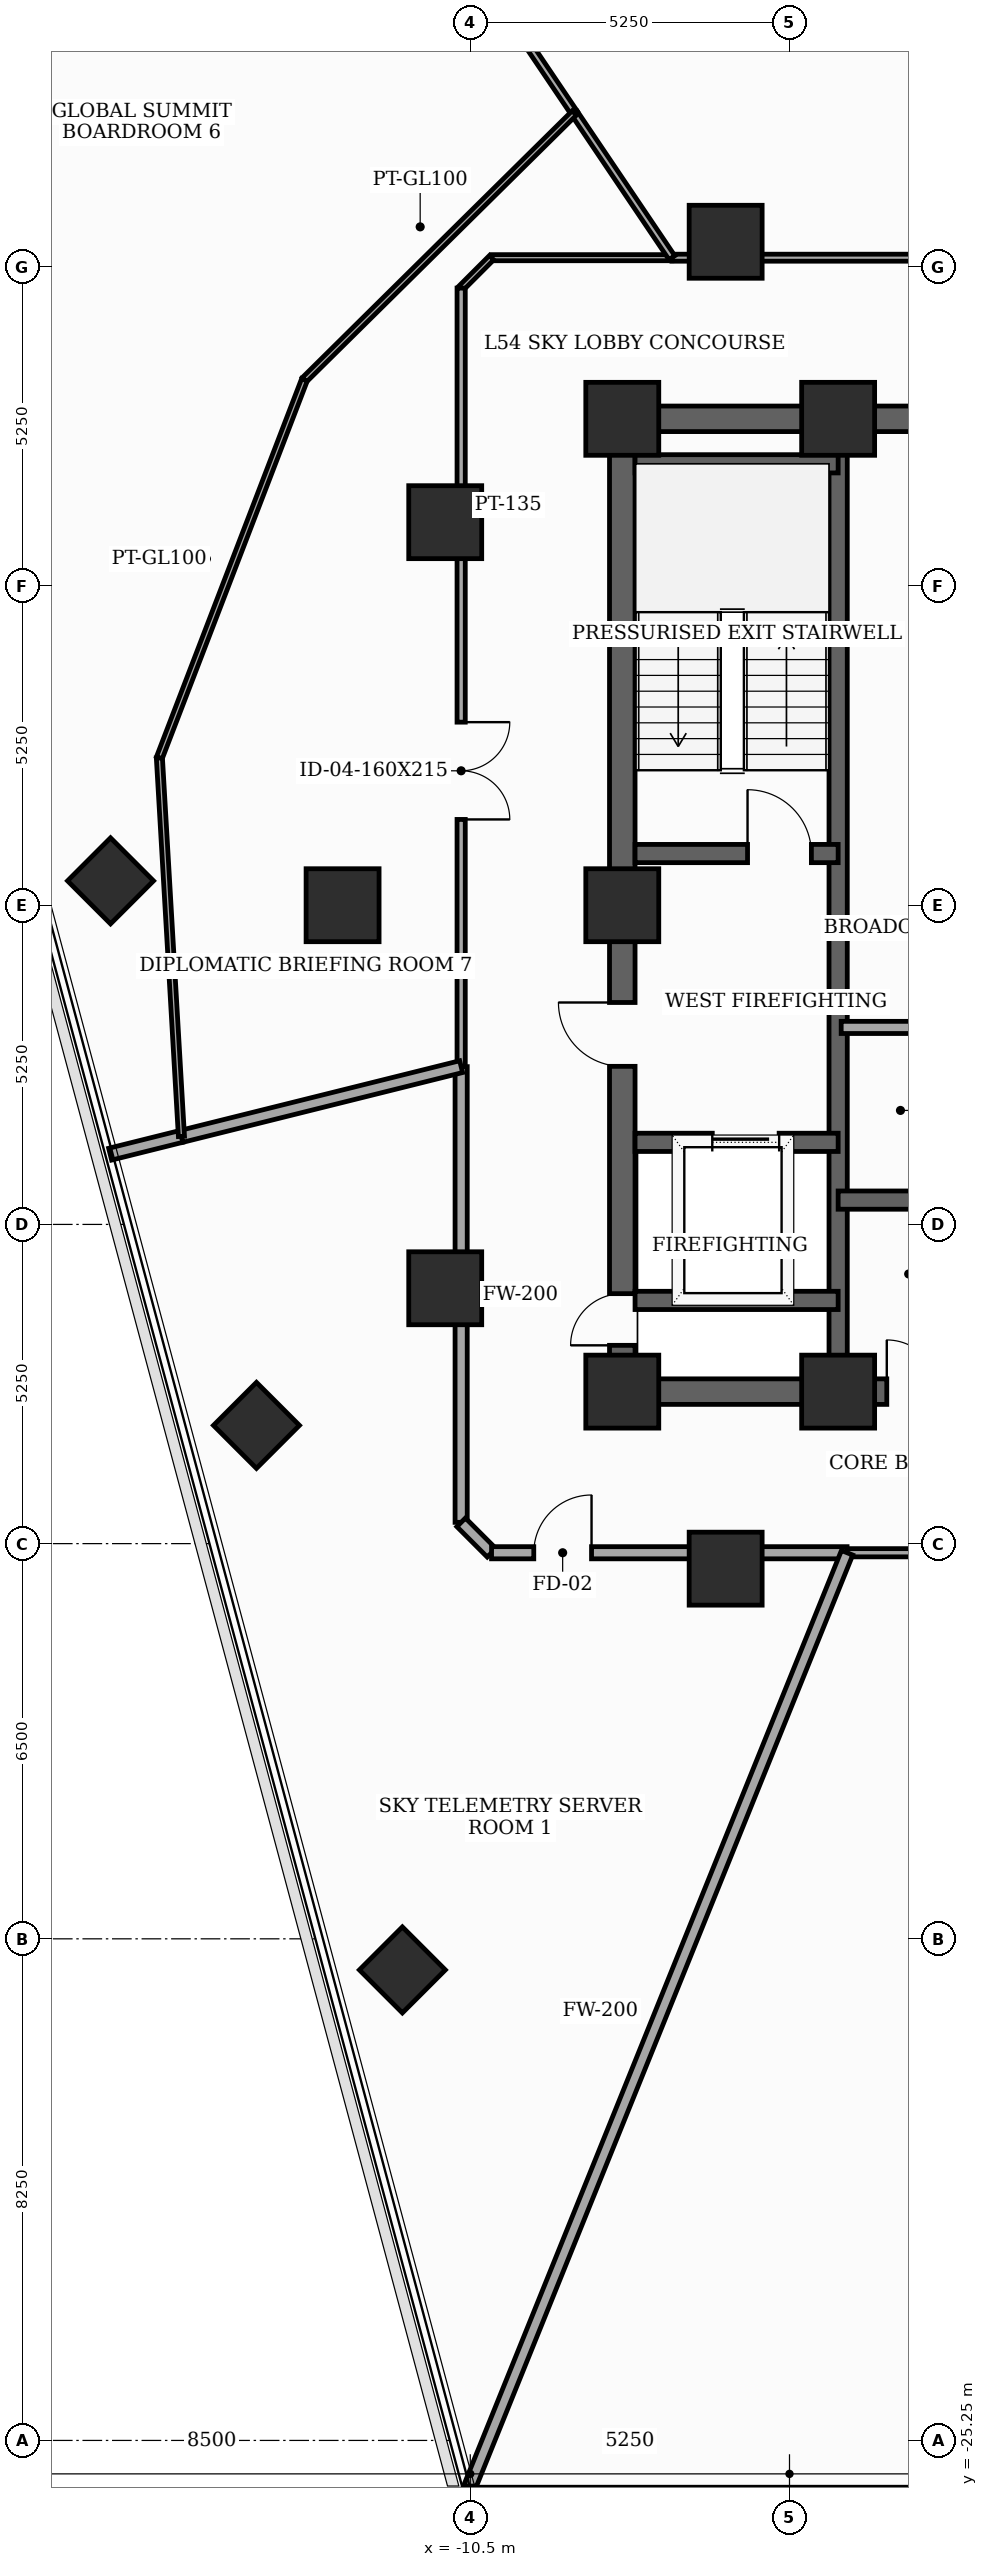
"""IFC4 building model, lengths in metres.
Left out: names, types, materials, properties, quantities, classifications, styles, units other than length and angle.
Written with IfcOpenShell. Run it as: python <this file> out.ifc"""

import sys

from ifc_helpers import new_model, si_unit, direction, frame, frame_2d, origin, origin_2d, place, context, subcontext, project, spatial, rectangle, extrude, element, fill, save


model = new_model("IFC4")
c1 = context("Model", 3, precision=1e-05, world=origin(), true_north=direction((0.0, 1.0)))
c2 = subcontext(c1, "Body", "Model", "MODEL_VIEW")
j1 = project(units=[si_unit("LENGTHUNIT", "METRE"), si_unit("PLANEANGLEUNIT", "RADIAN")], contexts=[c1])
p1 = place(None, origin())
s1 = spatial("IfcSite", under=j1, at=p1, CompositionType="ELEMENT")
p2 = place(p1, origin())
s2 = spatial("IfcBuilding", under=s1, at=p2, CompositionType="ELEMENT")
p3 = place(p2, frame((0.0, 0.0, 210.1)))
s3 = spatial("IfcBuildingStorey", under=s2, at=p3, CompositionType="ELEMENT", Elevation=210.1)
for number, where, z_axis, x_axis in (
    (1, (-8.0, -8.0, 0.0), (0.0, 0.0, 1.0), (1.0, 0.0, 0.0)),
    (2, (-4.45, -8.0, 0.0), (0.0, 0.0, 1.0), (1.0, 0.0, 0.0)),
    (3, (-4.45, 8.0, 0.0), (0.0, 0.0, 1.0), (1.0, 0.0, 0.0)),
    (4, (-8.0, 8.0, 0.0), (0.0, 0.0, 1.0), (1.0, 0.0, 0.0)),
    (5, (-8.0, 0.0, 0.0), (0.0, 0.0, 1.0), (1.0, 0.0, 0.0)),
    (6, (-6.3, 10.912, 0.0), (0.0, 0.0, 1.0), (1.0, 0.0, 0.0)),
    (7, (-10.912, 6.3, 0.0), (0.0, 0.0, 1.0), (1.0, 0.0, 0.0)),
    (8, (-12.6, 0.0, 0.0), (0.0, 0.0, 1.0), (1.0, 0.0, 0.0)),
    (9, (-10.912, -6.3, 0.0), (0.0, 0.0, 1.0), (1.0, 0.0, 0.0)),
    (10, (-6.3, -10.912, 0.0), (0.0, 0.0, 1.0), (1.0, 0.0, 0.0)),
):
    element("IfcColumn", number, at=place(p3, frame(where, z_axis=z_axis, x_axis=x_axis)), inside=s3, PredefinedType="COLUMN", context=c2, shape_type="SweptSolid", body=[
        extrude(rectangle(XDim=1.2, YDim=1.2, at=origin_2d()), origin(), (0.0, 0.0, 1.0), 3.7),
    ])
for number, where, z_axis, x_axis in (
    (11, (-16.416, 0.401, 0.0), (0.0, 0.0, 1.0), (0.707, 0.707, 0.0)),
    (12, (-14.016, -8.555, 0.0), (0.0, 0.0, 1.0), (0.707, 0.707, 0.0)),
    (13, (-11.616, -17.511, 0.0), (0.0, 0.0, 1.0), (0.707, 0.707, 0.0)),
):
    element("IfcColumn", number, at=place(p3, frame(where, z_axis=z_axis, x_axis=x_axis)), inside=s3, PredefinedType="COLUMN", context=c2, shape_type="SweptSolid", body=[
        extrude(rectangle(XDim=1.0, YDim=1.0, at=origin_2d()), origin(), (0.0, 0.0, 1.0), 3.7),
    ])
p4 = place(p3, frame((-8.0, -8.0, 0.0), z_axis=(0.0, 0.0, 1.0), x_axis=(0.0, 1.0, 0.0)))
e14 = element("IfcWall", 14, at=p4, inside=s3, PredefinedType="SHEAR", context=c2, shape_type="SweptSolid", body=[
    extrude(rectangle(XDim=16.0, YDim=0.42, at=frame_2d((8.0, 0.0))), origin(), (0.0, 0.0, 1.0), 3.46),
])
p5 = place(p4, frame((0.761, 0.0, 0.0)))
e15 = element("IfcOpeningElement", 15, at=p5, cuts=e14, PredefinedType="OPENING", context=c2, shape_type="SweptSolid", body=[
    extrude(rectangle(XDim=0.85, YDim=2.02, at=frame_2d((0.425, 1.01))), frame((0.0, 0.22, 0.0), z_axis=(0.0, -1.0, 0.0), x_axis=(1.0, 0.0, 0.0)), (0.0, 0.0, 1.0), 0.44),
])
p6 = place(p4, frame((5.35, 0.0, 0.0)))
e16 = element("IfcOpeningElement", 16, at=p6, cuts=e14, PredefinedType="OPENING", context=c2, shape_type="SweptSolid", body=[
    extrude(rectangle(XDim=1.05, YDim=2.15, at=frame_2d((0.525, 1.075))), frame((0.0, 0.22, 0.0), z_axis=(0.0, -1.0, 0.0), x_axis=(1.0, 0.0, 0.0)), (0.0, 0.0, 1.0), 0.44),
])
p7 = place(p3, frame((-8.0, -8.0, 0.0), z_axis=(0.0, 0.0, 1.0), x_axis=(1.0, 0.0, 0.0)))
e17 = element("IfcWall", 17, at=p7, inside=s3, PredefinedType="SHEAR", context=c2, shape_type="SweptSolid", body=[
    extrude(rectangle(XDim=16.0, YDim=0.42, at=frame_2d((8.0, 0.0))), origin(), (0.0, 0.0, 1.0), 3.46),
])
p8 = place(p7, frame((4.35, 0.0, 0.0)))
e18 = element("IfcOpeningElement", 18, at=p8, cuts=e17, PredefinedType="OPENING", context=c2, shape_type="SweptSolid", body=[
    extrude(rectangle(XDim=0.85, YDim=2.02, at=frame_2d((0.425, 1.01))), frame((0.0, 0.22, 0.0), z_axis=(0.0, -1.0, 0.0), x_axis=(1.0, 0.0, 0.0)), (0.0, 0.0, 1.0), 0.44),
])
p9 = place(p7, frame((6.49, 0.0, 0.0)))
e19 = element("IfcOpeningElement", 19, at=p9, cuts=e17, PredefinedType="OPENING", context=c2, shape_type="SweptSolid", body=[
    extrude(rectangle(XDim=0.85, YDim=2.02, at=frame_2d((0.425, 1.01))), frame((0.0, 0.22, 0.0), z_axis=(0.0, -1.0, 0.0), x_axis=(1.0, 0.0, 0.0)), (0.0, 0.0, 1.0), 0.44),
])
p10 = place(p7, frame((8.69, 0.0, 0.0)))
e20 = element("IfcOpeningElement", 20, at=p10, cuts=e17, PredefinedType="OPENING", context=c2, shape_type="SweptSolid", body=[
    extrude(rectangle(XDim=0.85, YDim=2.02, at=frame_2d((0.425, 1.01))), frame((0.0, 0.22, 0.0), z_axis=(0.0, -1.0, 0.0), x_axis=(1.0, 0.0, 0.0)), (0.0, 0.0, 1.0), 0.44),
])
p11 = place(p7, frame((10.8, 0.0, 0.0)))
e21 = element("IfcOpeningElement", 21, at=p11, cuts=e17, PredefinedType="OPENING", context=c2, shape_type="SweptSolid", body=[
    extrude(rectangle(XDim=0.85, YDim=2.02, at=frame_2d((0.425, 1.01))), frame((0.0, 0.22, 0.0), z_axis=(0.0, -1.0, 0.0), x_axis=(1.0, 0.0, 0.0)), (0.0, 0.0, 1.0), 0.44),
])
p12 = place(p3, frame((-8.0, 8.0, 0.0), z_axis=(0.0, 0.0, 1.0), x_axis=(1.0, 0.0, 0.0)))
e22 = element("IfcWall", 22, at=p12, inside=s3, PredefinedType="SHEAR", context=c2, shape_type="SweptSolid", body=[
    extrude(rectangle(XDim=16.0, YDim=0.42, at=frame_2d((8.0, 0.0))), origin(), (0.0, 0.0, 1.0), 3.46),
])
p13 = place(p12, frame((7.1, 0.0, 0.0)))
e23 = element("IfcOpeningElement", 23, at=p13, cuts=e22, PredefinedType="OPENING", context=c2, shape_type="SweptSolid", body=[
    extrude(rectangle(XDim=1.8, YDim=2.15, at=frame_2d((0.9, 1.075))), frame((0.0, 0.22, 0.0), z_axis=(0.0, -1.0, 0.0), x_axis=(1.0, 0.0, 0.0)), (0.0, 0.0, 1.0), 0.44),
])
p14 = place(p3, frame((-4.45, -7.79, 0.0), z_axis=(0.0, 0.0, 1.0), x_axis=(0.0, 1.0, 0.0)))
e24 = element("IfcWall", 24, at=p14, inside=s3, PredefinedType="SHEAR", context=c2, shape_type="SweptSolid", body=[
    extrude(rectangle(XDim=15.58, YDim=0.3, at=frame_2d((7.79, 0.0))), origin(), (0.0, 0.0, 1.0), 3.46),
])
p15 = place(p3, frame((-7.79, 0.85, 0.0), z_axis=(0.0, 0.0, 1.0), x_axis=(1.0, 0.0, 0.0)))
e25 = element("IfcWall", 25, at=p15, inside=s3, PredefinedType="SHEAR", context=c2, shape_type="SweptSolid", body=[
    extrude(rectangle(XDim=3.34, YDim=0.3, at=frame_2d((1.67, 0.0))), origin(), (0.0, 0.0, 1.0), 3.46),
])
p16 = place(p15, frame((1.85, 0.0, 0.0)))
e26 = element("IfcOpeningElement", 26, at=p16, cuts=e25, PredefinedType="OPENING", context=c2, shape_type="SweptSolid", body=[
    extrude(rectangle(XDim=1.05, YDim=2.15, at=frame_2d((0.525, 1.075))), frame((0.0, 0.16, 0.0), z_axis=(0.0, -1.0, 0.0), x_axis=(1.0, 0.0, 0.0)), (0.0, 0.0, 1.0), 0.32),
])
p17 = place(p3, frame((-7.79, 7.26, 0.0), z_axis=(0.0, 0.0, 1.0), x_axis=(1.0, 0.0, 0.0)))
e27 = element("IfcWall", 27, at=p17, inside=s3, PredefinedType="SHEAR", context=c2, shape_type="SweptSolid", body=[
    extrude(rectangle(XDim=3.34, YDim=0.3, at=frame_2d((1.67, 0.0))), origin(), (0.0, 0.0, 1.0), 3.46),
])
p18 = place(p3, frame((-7.79, -3.9, 0.0), z_axis=(0.0, 0.0, 1.0), x_axis=(1.0, 0.0, 0.0)))
e28 = element("IfcWall", 28, at=p18, inside=s3, PredefinedType="SHEAR", context=c2, shape_type="SweptSolid", body=[
    extrude(rectangle(XDim=3.34, YDim=0.3, at=frame_2d((1.67, 0.0))), origin(), (0.0, 0.0, 1.0), 3.46),
])
p19 = place(p18, frame((1.27, 0.0, 0.0)))
e29 = element("IfcOpeningElement", 29, at=p19, cuts=e28, PredefinedType="OPENING", context=c2, shape_type="SweptSolid", body=[
    extrude(rectangle(XDim=1.1, YDim=2.1, at=frame_2d((0.55, 1.05))), frame((0.0, 0.16, 0.0), z_axis=(0.0, -1.0, 0.0), x_axis=(1.0, 0.0, 0.0)), (0.0, 0.0, 1.0), 0.32),
])
p20 = place(p3, frame((-7.79, -6.5, 0.0), z_axis=(0.0, 0.0, 1.0), x_axis=(1.0, 0.0, 0.0)))
e30 = element("IfcWall", 30, at=p20, inside=s3, PredefinedType="SHEAR", context=c2, shape_type="SweptSolid", body=[
    extrude(rectangle(XDim=3.34, YDim=0.3, at=frame_2d((1.67, 0.0))), origin(), (0.0, 0.0, 1.0), 3.46),
])
p21 = place(p3, frame((-4.45, -4.85, 0.0), z_axis=(0.0, 0.0, 1.0), x_axis=(1.0, 0.0, 0.0)))
e31 = element("IfcWall", 31, at=p21, inside=s3, PredefinedType="SHEAR", context=c2, shape_type="SweptSolid", body=[
    extrude(rectangle(XDim=8.9, YDim=0.3, at=frame_2d((4.45, 0.0))), origin(), (0.0, 0.0, 1.0), 3.46),
])
p22 = place(p3, frame((-4.4, -2.01, 0.0), z_axis=(0.0, 0.0, 1.0), x_axis=(1.0, 0.0, 0.0)))
e32 = element("IfcWall", 32, at=p22, inside=s3, PredefinedType="SOLIDWALL", context=c2, shape_type="SweptSolid", body=[
    extrude(rectangle(XDim=2.68, YDim=0.2, at=frame_2d((1.34, 0.0))), origin(), (0.0, 0.0, 1.0), 3.46),
])
p23 = place(p3, frame((-10.65, -2.655, 0.0), z_axis=(0.0, 0.0, 1.0), x_axis=(0.0, -1.0, 0.0)))
e33 = element("IfcWall", 33, at=p23, inside=s3, PredefinedType="SOLIDWALL", context=c2, shape_type="SweptSolid", body=[
    extrude(rectangle(XDim=7.495, YDim=0.2, at=frame_2d((3.748, 0.0))), origin(), (0.0, 0.0, 1.0), 2.045),
])
p24 = place(p3, frame((-10.65, -10.15, 0.0), z_axis=(0.0, 0.0, 1.0), x_axis=(0.707106781187, -0.707106781187, 0.0)))
e34 = element("IfcWall", 34, at=p24, inside=s3, PredefinedType="SOLIDWALL", context=c2, shape_type="SweptSolid", body=[
    extrude(rectangle(XDim=0.707, YDim=0.2, at=frame_2d((0.354, 0.0))), origin(), (0.0, 0.0, 1.0), 3.46),
])
p25 = place(p3, frame((-10.15, -10.65, 0.0), z_axis=(0.0, 0.0, 1.0), x_axis=(1.0, 0.0, 0.0)))
e35 = element("IfcWall", 35, at=p25, inside=s3, PredefinedType="SOLIDWALL", context=c2, shape_type="SweptSolid", body=[
    extrude(rectangle(XDim=5.847, YDim=0.2, at=frame_2d((2.923, 0.0))), origin(), (0.0, 0.0, 1.0), 2.045),
])
p26 = place(p25, frame((0.694, 0.0, 0.0)))
e36 = element("IfcOpeningElement", 36, at=p26, cuts=e35, PredefinedType="OPENING", context=c2, shape_type="SweptSolid", body=[
    extrude(rectangle(XDim=0.95, YDim=2.0, at=frame_2d((0.475, 1.0))), frame((0.0, 0.11, 0.0), z_axis=(0.0, -1.0, 0.0), x_axis=(1.0, 0.0, 0.0)), (0.0, 0.0, 1.0), 0.22),
])
p27 = place(p3, frame((-4.303, -10.65, 0.0), z_axis=(0.0, 0.0, 1.0), x_axis=(1.0, 0.0, 0.0)))
e37 = element("IfcWall", 37, at=p27, inside=s3, PredefinedType="PARTITIONING", context=c2, shape_type="SweptSolid", body=[
    extrude(rectangle(XDim=12.041, YDim=0.135, at=frame_2d((6.021, 0.0))), origin(), (0.0, 0.0, 1.0), 2.045),
])
p28 = place(p27, frame((5.545, 0.0, 0.0)))
e38 = element("IfcOpeningElement", 38, at=p28, cuts=e37, PredefinedType="OPENING", context=c2, shape_type="SweptSolid", body=[
    extrude(rectangle(XDim=0.95, YDim=2.0, at=frame_2d((0.475, 1.0))), frame((0.0, 0.077, 0.0), z_axis=(0.0, -1.0, 0.0), x_axis=(1.0, 0.0, 0.0)), (0.0, 0.0, 1.0), 0.155),
])
p29 = place(p3, frame((3.46, 10.65, 0.0), z_axis=(0.0, 0.0, 1.0), x_axis=(-1.0, 0.0, 0.0)))
e39 = element("IfcWall", 39, at=p29, inside=s3, PredefinedType="PARTITIONING", context=c2, shape_type="SweptSolid", body=[
    extrude(rectangle(XDim=10.644, YDim=0.115, at=frame_2d((5.322, 0.0))), origin(), (0.0, 0.0, 1.0), 2.045),
])
p30 = place(p29, frame((4.847, 0.0, 0.0)))
e40 = element("IfcOpeningElement", 40, at=p30, cuts=e39, PredefinedType="OPENING", context=c2, shape_type="SweptSolid", body=[
    extrude(rectangle(XDim=0.95, YDim=2.0, at=frame_2d((0.475, 1.0))), frame((0.0, 0.067, 0.0), z_axis=(0.0, -1.0, 0.0), x_axis=(1.0, 0.0, 0.0)), (0.0, 0.0, 1.0), 0.135),
])
p31 = place(p3, frame((-7.184, 10.65, 0.0), z_axis=(0.0, 0.0, 1.0), x_axis=(-1.0, 0.0, 0.0)))
e41 = element("IfcWall", 41, at=p31, inside=s3, PredefinedType="MOVABLE", context=c2, shape_type="SweptSolid", body=[
    extrude(rectangle(XDim=2.966, YDim=0.1, at=frame_2d((1.483, 0.0))), origin(), (0.0, 0.0, 1.0), 2.045),
])
p32 = place(p3, frame((-10.15, 10.65, 0.0), z_axis=(0.0, 0.0, 1.0), x_axis=(-0.707106781187, -0.707106781187, 0.0)))
e42 = element("IfcWall", 42, at=p32, inside=s3, PredefinedType="MOVABLE", context=c2, shape_type="SweptSolid", body=[
    extrude(rectangle(XDim=0.707, YDim=0.1, at=frame_2d((0.354, 0.0))), origin(), (0.0, 0.0, 1.0), 3.46),
])
p33 = place(p3, frame((-10.65, 10.15, 0.0), z_axis=(0.0, 0.0, 1.0), x_axis=(0.0, -1.0, 0.0)))
e43 = element("IfcWall", 43, at=p33, inside=s3, PredefinedType="PARTITIONING", context=c2, shape_type="SweptSolid", body=[
    extrude(rectangle(XDim=12.805, YDim=0.135, at=frame_2d((6.402, 0.0))), origin(), (0.0, 0.0, 1.0), 2.845),
])
p34 = place(p33, frame((7.139, 0.0, 0.0)))
e44 = element("IfcOpeningElement", 44, at=p34, cuts=e43, PredefinedType="OPENING", context=c2, shape_type="SweptSolid", body=[
    extrude(rectangle(XDim=1.6, YDim=2.15, at=frame_2d((0.8, 1.075))), frame((0.0, 0.077, 0.0), z_axis=(0.0, -1.0, 0.0), x_axis=(1.0, 0.0, 0.0)), (0.0, 0.0, 1.0), 0.155),
])
p35 = place(p3, frame((-10.534, -26.073, 0.0), z_axis=(0.0, 0.0, 1.0), x_axis=(0.374584629334, 0.927192728329, 0.0)))
e45 = element("IfcWall", 45, at=p35, inside=s3, PredefinedType="SOLIDWALL", context=c2, shape_type="SweptSolid", body=[
    extrude(rectangle(XDim=16.634, YDim=0.2, at=frame_2d((8.317, 0.0))), origin(), (0.0, 0.0, 1.0), 2.045),
])
p36 = place(p3, frame((-15.25, -3.802, 0.0), z_axis=(0.0, 0.0, 1.0), x_axis=(-0.970237467776, -0.24215543794, 0.0)))
e46 = element("IfcWall", 46, at=p36, inside=s3, PredefinedType="SOLIDWALL", context=c2, shape_type="SweptSolid", body=[
    extrude(rectangle(XDim=1.209, YDim=0.2, at=frame_2d((0.604, 0.0))), origin(), (0.0, 0.0, 1.0), 2.045),
])
p37 = place(p3, frame((-10.65, -2.655, 0.0), z_axis=(0.0, 0.0, 1.0), x_axis=(-0.970293770758, -0.241929738617, 0.0)))
e47 = element("IfcWall", 47, at=p37, inside=s3, PredefinedType="SOLIDWALL", context=c2, shape_type="SweptSolid", body=[
    extrude(rectangle(XDim=4.741, YDim=0.2, at=frame_2d((2.371, 0.0))), origin(), (0.0, 0.0, 1.0), 2.045),
])
p38 = place(p3, frame((-14.424, 21.385, 0.0), z_axis=(0.0, 0.0, 1.0), x_axis=(0.559175745777, -0.829049145307, 0.0)))
e48 = element("IfcWall", 48, at=p38, inside=s3, PredefinedType="PARTITIONING", context=c2, shape_type="SweptSolid", body=[
    extrude(rectangle(XDim=10.078, YDim=0.115, at=frame_2d((5.039, 0.0))), origin(), (0.0, 0.0, 1.0), 2.045),
])
p39 = place(p38, frame((4.579, 0.0, 0.0)))
e49 = element("IfcOpeningElement", 49, at=p39, cuts=e48, PredefinedType="OPENING", context=c2, shape_type="SweptSolid", body=[
    extrude(rectangle(XDim=0.92, YDim=2.0, at=frame_2d((0.46, 1.0))), frame((0.0, 0.067, 0.0), z_axis=(0.0, -1.0, 0.0), x_axis=(1.0, 0.0, 0.0)), (0.0, 0.0, 1.0), 0.135),
])
p40 = place(p3, frame((-8.789, 13.03, 0.0), z_axis=(0.0, 0.0, 1.0), x_axis=(0.559088648107, -0.829107884149, 0.0)))
e50 = element("IfcWall", 50, at=p40, inside=s3, PredefinedType="PARTITIONING", context=c2, shape_type="SweptSolid", body=[
    extrude(rectangle(XDim=2.871, YDim=0.115, at=frame_2d((1.435, 0.0))), origin(), (0.0, 0.0, 1.0), 2.045),
])
p41 = place(p3, frame((-15.25, -3.802, 0.0), z_axis=(0.0, 0.0, 1.0), x_axis=(-0.058192086898, 0.998305404685, 0.0)))
e51 = element("IfcWall", 51, at=p41, inside=s3, PredefinedType="MOVABLE", context=c2, shape_type="SweptSolid", body=[
    extrude(rectangle(XDim=6.239, YDim=0.1, at=frame_2d((3.119, 0.0))), origin(), (0.0, 0.0, 1.0), 2.045),
])
p42 = place(p3, frame((-15.613, 2.426, 0.0), z_axis=(0.0, 0.0, 1.0), x_axis=(0.358379670906, 0.933575927004, 0.0)))
e52 = element("IfcWall", 52, at=p42, inside=s3, PredefinedType="MOVABLE", context=c2, shape_type="SweptSolid", body=[
    extrude(rectangle(XDim=6.66, YDim=0.1, at=frame_2d((3.33, 0.0))), origin(), (0.0, 0.0, 1.0), 2.045),
])
p43 = place(p3, frame((-13.226, 8.644, 0.0), z_axis=(0.0, 0.0, 1.0), x_axis=(0.711184246493, 0.703005666791, 0.0)))
e53 = element("IfcWall", 53, at=p43, inside=s3, PredefinedType="MOVABLE", context=c2, shape_type="SweptSolid", body=[
    extrude(rectangle(XDim=6.239, YDim=0.1, at=frame_2d((3.12, 0.0))), origin(), (0.0, 0.0, 1.0), 2.045),
])
p44 = place(p5, origin())
e54 = element("IfcDoor", 54, at=p44, inside=s3, OperationType="SINGLE_SWING_LEFT", PredefinedType="TRAPDOOR", context=c2, shape_type="SweptSolid", body=[
    extrude(rectangle(XDim=0.85, YDim=2.02, at=frame_2d((0.425, 1.01))), frame((0.0, 0.025, 0.0), z_axis=(0.0, -1.0, 0.0), x_axis=(1.0, 0.0, 0.0)), (0.0, 0.0, 1.0), 0.05),
])
fill(e15, e54)
p45 = place(p6, origin())
e55 = element("IfcDoor", 55, at=p45, inside=s3, OperationType="SINGLE_SWING_RIGHT", PredefinedType="DOOR", context=c2, shape_type="SweptSolid", body=[
    extrude(rectangle(XDim=1.05, YDim=2.15, at=frame_2d((0.525, 1.075))), frame((0.0, 0.025, 0.0), z_axis=(0.0, -1.0, 0.0), x_axis=(1.0, 0.0, 0.0)), (0.0, 0.0, 1.0), 0.05),
])
fill(e16, e55)
p46 = place(p8, origin())
e56 = element("IfcDoor", 56, at=p46, inside=s3, OperationType="SINGLE_SWING_LEFT", PredefinedType="TRAPDOOR", context=c2, shape_type="SweptSolid", body=[
    extrude(rectangle(XDim=0.85, YDim=2.02, at=frame_2d((0.425, 1.01))), frame((0.0, 0.025, 0.0), z_axis=(0.0, -1.0, 0.0), x_axis=(1.0, 0.0, 0.0)), (0.0, 0.0, 1.0), 0.05),
])
fill(e18, e56)
p47 = place(p16, origin())
e57 = element("IfcDoor", 57, at=p47, inside=s3, OperationType="SINGLE_SWING_LEFT", PredefinedType="DOOR", context=c2, shape_type="SweptSolid", body=[
    extrude(rectangle(XDim=1.05, YDim=2.15, at=frame_2d((0.525, 1.075))), frame((0.0, 0.025, 0.0), z_axis=(0.0, -1.0, 0.0), x_axis=(1.0, 0.0, 0.0)), (0.0, 0.0, 1.0), 0.05),
])
fill(e26, e57)
p48 = place(p19, origin())
e58 = element("IfcDoor", 58, at=p48, inside=s3, OperationType="SLIDING_TO_LEFT", PredefinedType="DOOR", context=c2, shape_type="SweptSolid", body=[
    extrude(rectangle(XDim=1.1, YDim=2.1, at=frame_2d((0.55, 1.05))), frame((0.0, 0.025, 0.0), z_axis=(0.0, -1.0, 0.0), x_axis=(1.0, 0.0, 0.0)), (0.0, 0.0, 1.0), 0.05),
])
fill(e29, e58)
p49 = place(p26, origin())
e59 = element("IfcDoor", 59, at=p49, inside=s3, OperationType="SINGLE_SWING_RIGHT", PredefinedType="DOOR", context=c2, shape_type="SweptSolid", body=[
    extrude(rectangle(XDim=0.95, YDim=2.0, at=frame_2d((0.475, 1.0))), frame((0.0, 0.025, 0.0), z_axis=(0.0, -1.0, 0.0), x_axis=(1.0, 0.0, 0.0)), (0.0, 0.0, 1.0), 0.05),
])
fill(e36, e59)
p50 = place(p34, origin())
e60 = element("IfcDoor", 60, at=p50, inside=s3, OperationType="DOUBLE_DOOR_SINGLE_SWING", PredefinedType="DOOR", context=c2, shape_type="SweptSolid", body=[
    extrude(rectangle(XDim=1.6, YDim=2.15, at=frame_2d((0.8, 1.075))), frame((0.0, 0.025, 0.0), z_axis=(0.0, -1.0, 0.0), x_axis=(1.0, 0.0, 0.0)), (0.0, 0.0, 1.0), 0.05),
])
fill(e44, e60)
save(model, sys.argv[1])
